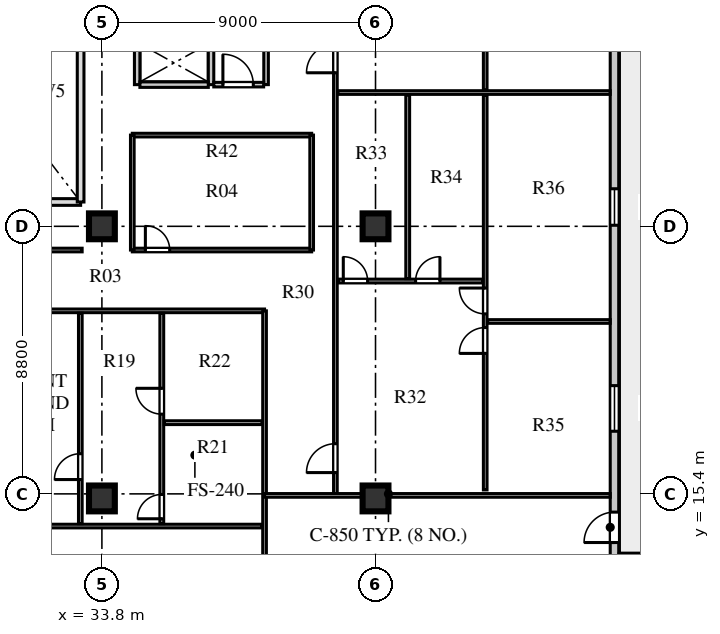
"""IFC4 building model, lengths in metres.
Left out: names, types, materials, properties, quantities, classifications, styles, units other than length and angle.
Written with IfcOpenShell. Run it as: python <this file> out.ifc"""

import sys

from ifc_helpers import new_model, si_unit, direction, frame, frame_2d, origin, origin_2d, place, context, subcontext, project, spatial, rectangle, extrude, element, fill, save


model = new_model("IFC4")
c1 = context("Model", 3, precision=1e-05, world=origin(), true_north=direction((0.0, 1.0)))
c2 = subcontext(c1, "Body", "Model", "MODEL_VIEW")
j1 = project(units=[si_unit("LENGTHUNIT", "METRE"), si_unit("PLANEANGLEUNIT", "RADIAN")], contexts=[c1])
p1 = place(None, origin())
s1 = spatial("IfcSite", under=j1, at=p1, CompositionType="ELEMENT")
p2 = place(p1, origin())
s2 = spatial("IfcBuilding", under=s1, at=p2, CompositionType="ELEMENT")
p3 = place(p2, frame((0.0, 0.0, 214.1)))
s3 = spatial("IfcBuildingStorey", under=s2, at=p3, CompositionType="ELEMENT", Elevation=214.1)
for number, where, z_axis, x_axis in (
    (1, (33.8, 15.25, 0.0), (0.0, 0.0, 1.0), (1.0, 0.0, 0.0)),
    (2, (33.8, 24.2, 0.0), (0.0, 0.0, 1.0), (1.0, 0.0, 0.0)),
    (3, (42.8, 15.25, 0.0), (0.0, 0.0, 1.0), (1.0, 0.0, 0.0)),
    (4, (42.8, 24.2, 0.0), (0.0, 0.0, 1.0), (1.0, 0.0, 0.0)),
):
    element("IfcColumn", number, at=place(p3, frame(where, z_axis=z_axis, x_axis=x_axis)), inside=s3, PredefinedType="COLUMN", context=c2, shape_type="SweptSolid", body=[
        extrude(rectangle(XDim=0.85, YDim=0.85, at=origin_2d()), origin(), (0.0, 0.0, 1.0), 3.66),
    ])
p4 = place(p3, frame((50.66, 13.13, 0.0), z_axis=(0.0, 0.0, 1.0), x_axis=(0.0, 1.0, 0.0)))
e5 = element("IfcWall", 5, at=p4, inside=s3, PredefinedType="STANDARD", context=c2, shape_type="SweptSolid", body=[
    extrude(rectangle(XDim=30.94, YDim=0.28, at=frame_2d((15.47, 0.0))), origin(), (0.0, 0.0, 1.0), 3.66),
])
p5 = place(p4, frame((0.67, 0.0, 0.0)))
e6 = element("IfcOpeningElement", 6, at=p5, cuts=e5, PredefinedType="OPENING", context=c2, shape_type="SweptSolid", body=[
    extrude(rectangle(XDim=1.0, YDim=2.05, at=frame_2d((0.5, 1.025))), frame((0.0, 0.15, 0.0), z_axis=(0.0, -1.0, 0.0), x_axis=(1.0, 0.0, 0.0)), (0.0, 0.0, 1.0), 0.3),
])
p6 = place(p4, frame((4.33, 0.0, 0.8)))
e7 = element("IfcOpeningElement", 7, at=p6, cuts=e5, PredefinedType="OPENING", context=c2, shape_type="SweptSolid", body=[
    extrude(rectangle(XDim=1.5, YDim=2.0, at=frame_2d((0.75, 1.0))), frame((0.0, 0.15, 0.0), z_axis=(0.0, -1.0, 0.0), x_axis=(1.0, 0.0, 0.0)), (0.0, 0.0, 1.0), 0.3),
])
p7 = place(p4, frame((11.105, 0.0, 0.8)))
e8 = element("IfcOpeningElement", 8, at=p7, cuts=e5, PredefinedType="OPENING", context=c2, shape_type="SweptSolid", body=[
    extrude(rectangle(XDim=1.2, YDim=1.75, at=frame_2d((0.6, 0.875))), frame((0.0, 0.15, 0.0), z_axis=(0.0, -1.0, 0.0), x_axis=(1.0, 0.0, 0.0)), (0.0, 0.0, 1.0), 0.3),
])
p8 = place(p4, frame((17.558, 0.0, 0.8)))
e9 = element("IfcOpeningElement", 9, at=p8, cuts=e5, PredefinedType="OPENING", context=c2, shape_type="SweptSolid", body=[
    extrude(rectangle(XDim=2.4, YDim=2.05, at=frame_2d((1.2, 1.025))), frame((0.0, 0.15, 0.0), z_axis=(0.0, -1.0, 0.0), x_axis=(1.0, 0.0, 0.0)), (0.0, 0.0, 1.0), 0.3),
])
p9 = place(p4, frame((24.332, 0.0, 0.8)))
e10 = element("IfcOpeningElement", 10, at=p9, cuts=e5, PredefinedType="OPENING", context=c2, shape_type="SweptSolid", body=[
    extrude(rectangle(XDim=2.1, YDim=1.95, at=frame_2d((1.05, 0.975))), frame((0.0, 0.15, 0.0), z_axis=(0.0, -1.0, 0.0), x_axis=(1.0, 0.0, 0.0)), (0.0, 0.0, 1.0), 0.3),
])
p10 = place(p4, frame((29.175, 0.0, 0.8)))
e11 = element("IfcOpeningElement", 11, at=p10, cuts=e5, PredefinedType="OPENING", context=c2, shape_type="SweptSolid", body=[
    extrude(rectangle(XDim=1.2, YDim=1.75, at=frame_2d((0.6, 0.875))), frame((0.0, 0.15, 0.0), z_axis=(0.0, -1.0, 0.0), x_axis=(1.0, 0.0, 0.0)), (0.0, 0.0, 1.0), 0.3),
])
p11 = place(p3, frame((34.96, 28.86, 0.0), z_axis=(0.0, 0.0, 1.0), x_axis=(0.0, 1.0, 0.0)))
e12 = element("IfcWall", 12, at=p11, inside=s3, PredefinedType="SOLIDWALL", context=c2, shape_type="SweptSolid", body=[
    extrude(rectangle(XDim=4.22, YDim=0.18, at=frame_2d((2.11, 0.0))), origin(), (0.0, 0.0, 1.0), 3.66),
])
p12 = place(p3, frame((37.39, 28.86, 0.0), z_axis=(0.0, 0.0, 1.0), x_axis=(0.0, 1.0, 0.0)))
e13 = element("IfcWall", 13, at=p12, inside=s3, PredefinedType="SOLIDWALL", context=c2, shape_type="SweptSolid", body=[
    extrude(rectangle(XDim=4.22, YDim=0.18, at=frame_2d((2.11, 0.0))), origin(), (0.0, 0.0, 1.0), 3.66),
])
p13 = place(p12, frame((2.1, 0.0, 0.0)))
e14 = element("IfcOpeningElement", 14, at=p13, cuts=e13, PredefinedType="OPENING", context=c2, shape_type="SweptSolid", body=[
    extrude(rectangle(XDim=1.2, YDim=2.12, at=frame_2d((0.6, 1.06))), frame((0.0, 0.1, 0.0), z_axis=(0.0, -1.0, 0.0), x_axis=(1.0, 0.0, 0.0)), (0.0, 0.0, 1.0), 0.2),
])
p14 = place(p3, frame((35.05, 28.86, 0.0), z_axis=(0.0, 0.0, 1.0), x_axis=(1.0, 0.0, 0.0)))
e15 = element("IfcWall", 15, at=p14, inside=s3, PredefinedType="SOLIDWALL", context=c2, shape_type="SweptSolid", body=[
    extrude(rectangle(XDim=2.25, YDim=0.18, at=frame_2d((1.125, 0.0))), origin(), (0.0, 0.0, 1.0), 3.66),
])
p15 = place(p3, frame((39.2, 28.86, 0.0), z_axis=(0.0, 0.0, 1.0), x_axis=(0.0, 1.0, 0.0)))
e16 = element("IfcWall", 16, at=p15, inside=s3, PredefinedType="PARTITIONING", context=c2, shape_type="SweptSolid", body=[
    extrude(rectangle(XDim=4.22, YDim=0.15, at=frame_2d((2.11, 0.0))), origin(), (0.0, 0.0, 1.0), 3.66),
])
p16 = place(p3, frame((37.48, 28.86, 0.0), z_axis=(0.0, 0.0, 1.0), x_axis=(1.0, 0.0, 0.0)))
e17 = element("IfcWall", 17, at=p16, inside=s3, PredefinedType="PARTITIONING", context=c2, shape_type="SweptSolid", body=[
    extrude(rectangle(XDim=1.64, YDim=0.15, at=frame_2d((0.82, 0.0))), origin(), (0.0, 0.0, 1.0), 3.66),
])
p17 = place(p16, frame((0.3, 0.0, 0.0)))
e18 = element("IfcOpeningElement", 18, at=p17, cuts=e17, PredefinedType="OPENING", context=c2, shape_type="SweptSolid", body=[
    extrude(rectangle(XDim=1.0, YDim=2.1, at=frame_2d((0.5, 1.05))), frame((0.0, 0.085, 0.0), z_axis=(0.0, -1.0, 0.0), x_axis=(1.0, 0.0, 0.0)), (0.0, 0.0, 1.0), 0.17),
])
p18 = place(p3, frame((27.08, 21.42, 0.0), z_axis=(0.0, 0.0, 1.0), x_axis=(1.0, 0.0, 0.0)))
e19 = element("IfcWall", 19, at=p18, inside=s3, PredefinedType="PARTITIONING", context=c2, shape_type="SweptSolid", body=[
    extrude(rectangle(XDim=12.07, YDim=0.12, at=frame_2d((6.035, 0.0))), origin(), (0.0, 0.0, 1.0), 3.31),
])
p19 = place(p18, frame((0.63, 0.0, 0.0)))
e20 = element("IfcOpeningElement", 20, at=p19, cuts=e19, PredefinedType="OPENING", context=c2, shape_type="SweptSolid", body=[
    extrude(rectangle(XDim=0.95, YDim=2.1, at=frame_2d((0.475, 1.05))), frame((0.0, 0.07, 0.0), z_axis=(0.0, -1.0, 0.0), x_axis=(1.0, 0.0, 0.0)), (0.0, 0.0, 1.0), 0.14),
])
p20 = place(p3, frame((27.15, 23.42, 0.0), z_axis=(0.0, 0.0, 1.0), x_axis=(1.0, 0.0, 0.0)))
e21 = element("IfcWall", 21, at=p20, inside=s3, PredefinedType="PARTITIONING", context=c2, shape_type="SweptSolid", body=[
    extrude(rectangle(XDim=6.0, YDim=0.12, at=frame_2d((3.0, 0.0))), origin(), (0.0, 0.0, 1.0), 3.66),
])
p21 = place(p3, frame((39.15, 7.88, 0.0), z_axis=(0.0, 0.0, 1.0), x_axis=(0.0, 1.0, 0.0)))
e22 = element("IfcWall", 22, at=p21, inside=s3, PredefinedType="PARTITIONING", context=c2, shape_type="SweptSolid", body=[
    extrude(rectangle(XDim=13.54, YDim=0.12, at=frame_2d((6.77, 0.0))), origin(), (0.0, 0.0, 1.0), 3.66),
])
p22 = place(p3, frame((27.24, 14.341, 0.0), z_axis=(0.0, 0.0, 1.0), x_axis=(1.0, 0.0, 0.0)))
e23 = element("IfcWall", 23, at=p22, inside=s3, PredefinedType="PARTITIONING", context=c2, shape_type="SweptSolid", body=[
    extrude(rectangle(XDim=11.83, YDim=0.12, at=frame_2d((5.915, 0.0))), origin(), (0.0, 0.0, 1.0), 3.66),
])
p23 = place(p22, frame((0.3, 0.0, 0.0)))
e24 = element("IfcOpeningElement", 24, at=p23, cuts=e23, PredefinedType="OPENING", context=c2, shape_type="SweptSolid", body=[
    extrude(rectangle(XDim=0.85, YDim=2.08, at=frame_2d((0.425, 1.04))), frame((0.0, 0.07, 0.0), z_axis=(0.0, -1.0, 0.0), x_axis=(1.0, 0.0, 0.0)), (0.0, 0.0, 1.0), 0.14),
])
p24 = place(p22, frame((3.135, 0.0, 0.0)))
e25 = element("IfcOpeningElement", 25, at=p24, cuts=e23, PredefinedType="OPENING", context=c2, shape_type="SweptSolid", body=[
    extrude(rectangle(XDim=0.85, YDim=2.08, at=frame_2d((0.425, 1.04))), frame((0.0, 0.07, 0.0), z_axis=(0.0, -1.0, 0.0), x_axis=(1.0, 0.0, 0.0)), (0.0, 0.0, 1.0), 0.14),
])
p25 = place(p3, frame((35.77, 14.421, 0.0), z_axis=(0.0, 0.0, 1.0), x_axis=(0.0, 1.0, 0.0)))
e26 = element("IfcWall", 26, at=p25, inside=s3, PredefinedType="PLUMBINGWALL", context=c2, shape_type="SweptSolid", body=[
    extrude(rectangle(XDim=6.919, YDim=0.125, at=frame_2d((3.459, 0.0))), origin(), (0.0, 0.0, 1.0), 3.66),
])
p26 = place(p25, frame((0.16, 0.0, 0.0)))
e27 = element("IfcOpeningElement", 27, at=p26, cuts=e26, PredefinedType="OPENING", context=c2, shape_type="SweptSolid", body=[
    extrude(rectangle(XDim=0.8, YDim=2.05, at=frame_2d((0.4, 1.025))), frame((0.0, 0.073, 0.0), z_axis=(0.0, -1.0, 0.0), x_axis=(1.0, 0.0, 0.0)), (0.0, 0.0, 1.0), 0.145),
])
p27 = place(p25, frame((3.601, 0.0, 0.0)))
e28 = element("IfcOpeningElement", 28, at=p27, cuts=e26, PredefinedType="OPENING", context=c2, shape_type="SweptSolid", body=[
    extrude(rectangle(XDim=0.85, YDim=2.08, at=frame_2d((0.425, 1.04))), frame((0.0, 0.073, 0.0), z_axis=(0.0, -1.0, 0.0), x_axis=(1.0, 0.0, 0.0)), (0.0, 0.0, 1.0), 0.145),
])
p28 = place(p3, frame((35.85, 17.742, 0.0), z_axis=(0.0, 0.0, 1.0), x_axis=(1.0, 0.0, 0.0)))
e29 = element("IfcWall", 29, at=p28, inside=s3, PredefinedType="PLUMBINGWALL", context=c2, shape_type="SweptSolid", body=[
    extrude(rectangle(XDim=3.22, YDim=0.125, at=frame_2d((1.61, 0.0))), origin(), (0.0, 0.0, 1.0), 3.66),
])
p29 = place(p3, frame((33.09, 14.421, 0.0), z_axis=(0.0, 0.0, 1.0), x_axis=(0.0, 1.0, 0.0)))
e30 = element("IfcWall", 30, at=p29, inside=s3, PredefinedType="PARTITIONING", context=c2, shape_type="SweptSolid", body=[
    extrude(rectangle(XDim=6.919, YDim=0.12, at=frame_2d((3.459, 0.0))), origin(), (0.0, 0.0, 1.0), 3.66),
])
p30 = place(p29, frame((1.45, 0.0, 0.0)))
e31 = element("IfcOpeningElement", 31, at=p30, cuts=e30, PredefinedType="OPENING", context=c2, shape_type="SweptSolid", body=[
    extrude(rectangle(XDim=0.85, YDim=2.08, at=frame_2d((0.425, 1.04))), frame((0.0, 0.07, 0.0), z_axis=(0.0, -1.0, 0.0), x_axis=(1.0, 0.0, 0.0)), (0.0, 0.0, 1.0), 0.14),
])
p31 = place(p3, frame((41.48, 15.35, 0.0), z_axis=(0.0, 0.0, 1.0), x_axis=(0.0, 1.0, 0.0)))
e32 = element("IfcWall", 32, at=p31, inside=s3, PredefinedType="PARTITIONING", context=c2, shape_type="SweptSolid", body=[
    extrude(rectangle(XDim=26.5, YDim=0.12, at=frame_2d((13.25, 0.0))), origin(), (0.0, 0.0, 1.0), 3.66),
])
p32 = place(p31, frame((0.75, 0.0, 0.0)))
e33 = element("IfcOpeningElement", 33, at=p32, cuts=e32, PredefinedType="OPENING", context=c2, shape_type="SweptSolid", body=[
    extrude(rectangle(XDim=0.95, YDim=2.1, at=frame_2d((0.475, 1.05))), frame((0.0, 0.07, 0.0), z_axis=(0.0, -1.0, 0.0), x_axis=(1.0, 0.0, 0.0)), (0.0, 0.0, 1.0), 0.14),
])
p33 = place(p31, frame((13.9, 0.0, 0.0)))
e34 = element("IfcOpeningElement", 34, at=p33, cuts=e32, PredefinedType="OPENING", context=c2, shape_type="SweptSolid", body=[
    extrude(rectangle(XDim=0.95, YDim=2.1, at=frame_2d((0.475, 1.05))), frame((0.0, 0.07, 0.0), z_axis=(0.0, -1.0, 0.0), x_axis=(1.0, 0.0, 0.0)), (0.0, 0.0, 1.0), 0.14),
])
p34 = place(p3, frame((39.15, 15.35, 0.0), z_axis=(0.0, 0.0, 1.0), x_axis=(1.0, 0.0, 0.0)))
e35 = element("IfcWall", 35, at=p34, inside=s3, PredefinedType="PARTITIONING", context=c2, shape_type="SweptSolid", body=[
    extrude(rectangle(XDim=11.37, YDim=0.12, at=frame_2d((5.685, 0.0))), origin(), (0.0, 0.0, 1.0), 3.06),
])
p35 = place(p3, frame((46.408, 15.53, 0.0), z_axis=(0.0, 0.0, 1.0), x_axis=(0.0, 1.0, 0.0)))
e36 = element("IfcWall", 36, at=p35, inside=s3, PredefinedType="PARTITIONING", context=c2, shape_type="SweptSolid", body=[
    extrude(rectangle(XDim=12.99, YDim=0.12, at=frame_2d((6.495, 0.0))), origin(), (0.0, 0.0, 1.0), 3.66),
])
p36 = place(p35, frame((4.49, 0.0, 0.0)))
e37 = element("IfcOpeningElement", 37, at=p36, cuts=e36, PredefinedType="OPENING", context=c2, shape_type="SweptSolid", body=[
    extrude(rectangle(XDim=0.85, YDim=2.08, at=frame_2d((0.425, 1.04))), frame((0.0, 0.07, 0.0), z_axis=(0.0, -1.0, 0.0), x_axis=(1.0, 0.0, 0.0)), (0.0, 0.0, 1.0), 0.14),
])
p37 = place(p35, frame((5.79, 0.0, 0.0)))
e38 = element("IfcOpeningElement", 38, at=p37, cuts=e36, PredefinedType="OPENING", context=c2, shape_type="SweptSolid", body=[
    extrude(rectangle(XDim=0.85, YDim=2.08, at=frame_2d((0.425, 1.04))), frame((0.0, 0.07, 0.0), z_axis=(0.0, -1.0, 0.0), x_axis=(1.0, 0.0, 0.0)), (0.0, 0.0, 1.0), 0.14),
])
p38 = place(p3, frame((41.58, 22.4, 0.0), z_axis=(0.0, 0.0, 1.0), x_axis=(1.0, 0.0, 0.0)))
e39 = element("IfcWall", 39, at=p38, inside=s3, PredefinedType="PLUMBINGWALL", context=c2, shape_type="SweptSolid", body=[
    extrude(rectangle(XDim=4.748, YDim=0.125, at=frame_2d((2.374, 0.0))), origin(), (0.0, 0.0, 1.0), 3.66),
])
p39 = place(p38, frame((0.16, 0.0, 0.0)))
e40 = element("IfcOpeningElement", 40, at=p39, cuts=e39, PredefinedType="OPENING", context=c2, shape_type="SweptSolid", body=[
    extrude(rectangle(XDim=0.8, YDim=2.05, at=frame_2d((0.4, 1.025))), frame((0.0, 0.073, 0.0), z_axis=(0.0, -1.0, 0.0), x_axis=(1.0, 0.0, 0.0)), (0.0, 0.0, 1.0), 0.145),
])
p40 = place(p38, frame((2.539, 0.0, 0.0)))
e41 = element("IfcOpeningElement", 41, at=p40, cuts=e39, PredefinedType="OPENING", context=c2, shape_type="SweptSolid", body=[
    extrude(rectangle(XDim=0.8, YDim=2.05, at=frame_2d((0.4, 1.025))), frame((0.0, 0.073, 0.0), z_axis=(0.0, -1.0, 0.0), x_axis=(1.0, 0.0, 0.0)), (0.0, 0.0, 1.0), 0.145),
])
p41 = place(p3, frame((43.859, 22.48, 0.0), z_axis=(0.0, 0.0, 1.0), x_axis=(0.0, 1.0, 0.0)))
e42 = element("IfcWall", 42, at=p41, inside=s3, PredefinedType="PLUMBINGWALL", context=c2, shape_type="SweptSolid", body=[
    extrude(rectangle(XDim=6.04, YDim=0.125, at=frame_2d((3.02, 0.0))), origin(), (0.0, 0.0, 1.0), 3.66),
])
p42 = place(p3, frame((46.488, 21.07, 0.0), z_axis=(0.0, 0.0, 1.0), x_axis=(1.0, 0.0, 0.0)))
e43 = element("IfcWall", 43, at=p42, inside=s3, PredefinedType="PARTITIONING", context=c2, shape_type="SweptSolid", body=[
    extrude(rectangle(XDim=4.032, YDim=0.12, at=frame_2d((2.016, 0.0))), origin(), (0.0, 0.0, 1.0), 3.66),
])
p43 = place(p3, frame((41.56, 28.6, 0.0), z_axis=(0.0, 0.0, 1.0), x_axis=(1.0, 0.0, 0.0)))
e44 = element("IfcWall", 44, at=p43, inside=s3, PredefinedType="PARTITIONING", context=c2, shape_type="SweptSolid", body=[
    extrude(rectangle(XDim=8.96, YDim=0.12, at=frame_2d((4.48, 0.0))), origin(), (0.0, 0.0, 1.0), 3.66),
])
p44 = place(p3, frame((46.408, 28.68, 0.0), z_axis=(0.0, 0.0, 1.0), x_axis=(0.0, 1.0, 0.0)))
e45 = element("IfcWall", 45, at=p44, inside=s3, PredefinedType="PARTITIONING", context=c2, shape_type="SweptSolid", body=[
    extrude(rectangle(XDim=12.99, YDim=0.12, at=frame_2d((6.495, 0.0))), origin(), (0.0, 0.0, 1.0), 3.66),
])
p45 = place(p44, frame((5.445, 0.0, 0.0)))
e46 = element("IfcOpeningElement", 46, at=p45, cuts=e45, PredefinedType="OPENING", context=c2, shape_type="SweptSolid", body=[
    extrude(rectangle(XDim=0.85, YDim=2.08, at=frame_2d((0.425, 1.04))), frame((0.0, 0.07, 0.0), z_axis=(0.0, -1.0, 0.0), x_axis=(1.0, 0.0, 0.0)), (0.0, 0.0, 1.0), 0.14),
])
p46 = place(p44, frame((6.745, 0.0, 0.0)))
e47 = element("IfcOpeningElement", 47, at=p46, cuts=e45, PredefinedType="OPENING", context=c2, shape_type="SweptSolid", body=[
    extrude(rectangle(XDim=0.85, YDim=2.08, at=frame_2d((0.425, 1.04))), frame((0.0, 0.07, 0.0), z_axis=(0.0, -1.0, 0.0), x_axis=(1.0, 0.0, 0.0)), (0.0, 0.0, 1.0), 0.14),
])
p47 = place(p3, frame((34.8, 23.42, 0.0), z_axis=(0.0, 0.0, 1.0), x_axis=(1.0, 0.0, 0.0)))
e48 = element("IfcWall", 48, at=p47, inside=s3, PredefinedType="PARTITIONING", context=c2, shape_type="SweptSolid", body=[
    extrude(rectangle(XDim=5.9, YDim=0.12, at=frame_2d((2.95, 0.0))), origin(), (0.0, 0.0, 1.0), 3.66),
])
p48 = place(p47, frame((0.43, 0.0, 0.0)))
e49 = element("IfcOpeningElement", 49, at=p48, cuts=e48, PredefinedType="OPENING", context=c2, shape_type="SweptSolid", body=[
    extrude(rectangle(XDim=0.8, YDim=2.05, at=frame_2d((0.4, 1.025))), frame((0.0, 0.07, 0.0), z_axis=(0.0, -1.0, 0.0), x_axis=(1.0, 0.0, 0.0)), (0.0, 0.0, 1.0), 0.14),
])
p49 = place(p3, frame((34.8, 27.2, 0.0), z_axis=(0.0, 0.0, 1.0), x_axis=(1.0, 0.0, 0.0)))
e50 = element("IfcWall", 50, at=p49, inside=s3, PredefinedType="PARTITIONING", context=c2, shape_type="SweptSolid", body=[
    extrude(rectangle(XDim=5.9, YDim=0.12, at=frame_2d((2.95, 0.0))), origin(), (0.0, 0.0, 1.0), 3.31),
])
for number, where, z_axis, x_axis in (
    (51, (34.8, 23.42, 0.0), (0.0, 0.0, 1.0), (0.0, 1.0, 0.0)),
    (52, (40.7, 23.42, 0.0), (0.0, 0.0, 1.0), (0.0, 1.0, 0.0)),
):
    element("IfcWall", number, at=place(p3, frame(where, z_axis=z_axis, x_axis=x_axis)), inside=s3, PredefinedType="PARTITIONING", context=c2, shape_type="SweptSolid", body=[
        extrude(rectangle(XDim=3.78, YDim=0.12, at=frame_2d((1.89, 0.0))), origin(), (0.0, 0.0, 1.0), 3.66),
    ])
p50 = place(p5, frame((1.0, 0.0, 0.0), z_axis=(0.0, 0.0, 1.0), x_axis=(-1.0, 0.0, 0.0)))
e53 = element("IfcDoor", 53, at=p50, inside=s3, OperationType="SINGLE_SWING_RIGHT", PredefinedType="DOOR", context=c2, shape_type="SweptSolid", body=[
    extrude(rectangle(XDim=1.0, YDim=2.05, at=frame_2d((0.5, 1.025))), frame((0.0, 0.025, 0.0), z_axis=(0.0, -1.0, 0.0), x_axis=(1.0, 0.0, 0.0)), (0.0, 0.0, 1.0), 0.05),
])
fill(e6, e53)
p51 = place(p6, origin())
e54 = element("IfcWindow", 54, at=p51, inside=s3, PartitioningType="SINGLE_PANEL", PredefinedType="WINDOW", context=c2, shape_type="SweptSolid", body=[
    extrude(rectangle(XDim=1.5, YDim=2.0, at=frame_2d((0.75, 1.0))), frame((0.0, 0.03, 0.0), z_axis=(0.0, -1.0, 0.0), x_axis=(1.0, 0.0, 0.0)), (0.0, 0.0, 1.0), 0.06),
])
fill(e7, e54)
p52 = place(p7, origin())
e55 = element("IfcWindow", 55, at=p52, inside=s3, PartitioningType="SINGLE_PANEL", PredefinedType="WINDOW", context=c2, shape_type="SweptSolid", body=[
    extrude(rectangle(XDim=1.2, YDim=1.75, at=frame_2d((0.6, 0.875))), frame((0.0, 0.03, 0.0), z_axis=(0.0, -1.0, 0.0), x_axis=(1.0, 0.0, 0.0)), (0.0, 0.0, 1.0), 0.06),
])
fill(e8, e55)
p53 = place(p17, origin())
e56 = element("IfcDoor", 56, at=p53, inside=s3, OperationType="SINGLE_SWING_LEFT", PredefinedType="DOOR", context=c2, shape_type="SweptSolid", body=[
    extrude(rectangle(XDim=1.0, YDim=2.1, at=frame_2d((0.5, 1.05))), frame((0.0, 0.025, 0.0), z_axis=(0.0, -1.0, 0.0), x_axis=(1.0, 0.0, 0.0)), (0.0, 0.0, 1.0), 0.05),
])
fill(e18, e56)
p54 = place(p30, origin())
e57 = element("IfcDoor", 57, at=p54, inside=s3, OperationType="SINGLE_SWING_LEFT", PredefinedType="DOOR", context=c2, shape_type="SweptSolid", body=[
    extrude(rectangle(XDim=0.85, YDim=2.08, at=frame_2d((0.425, 1.04))), frame((0.0, 0.025, 0.0), z_axis=(0.0, -1.0, 0.0), x_axis=(1.0, 0.0, 0.0)), (0.0, 0.0, 1.0), 0.05),
])
fill(e31, e57)
p55 = place(p26, origin())
e58 = element("IfcDoor", 58, at=p55, inside=s3, OperationType="SINGLE_SWING_LEFT", PredefinedType="DOOR", context=c2, shape_type="SweptSolid", body=[
    extrude(rectangle(XDim=0.8, YDim=2.05, at=frame_2d((0.4, 1.025))), frame((0.0, 0.025, 0.0), z_axis=(0.0, -1.0, 0.0), x_axis=(1.0, 0.0, 0.0)), (0.0, 0.0, 1.0), 0.05),
])
fill(e27, e58)
p56 = place(p27, origin())
e59 = element("IfcDoor", 59, at=p56, inside=s3, OperationType="SINGLE_SWING_RIGHT", PredefinedType="DOOR", context=c2, shape_type="SweptSolid", body=[
    extrude(rectangle(XDim=0.85, YDim=2.08, at=frame_2d((0.425, 1.04))), frame((0.0, 0.025, 0.0), z_axis=(0.0, -1.0, 0.0), x_axis=(1.0, 0.0, 0.0)), (0.0, 0.0, 1.0), 0.05),
])
fill(e28, e59)
p57 = place(p39, origin())
e60 = element("IfcDoor", 60, at=p57, inside=s3, OperationType="SINGLE_SWING_LEFT", PredefinedType="DOOR", context=c2, shape_type="SweptSolid", body=[
    extrude(rectangle(XDim=0.8, YDim=2.05, at=frame_2d((0.4, 1.025))), frame((0.0, 0.025, 0.0), z_axis=(0.0, -1.0, 0.0), x_axis=(1.0, 0.0, 0.0)), (0.0, 0.0, 1.0), 0.05),
])
fill(e40, e60)
p58 = place(p40, origin())
e61 = element("IfcDoor", 61, at=p58, inside=s3, OperationType="SINGLE_SWING_RIGHT", PredefinedType="DOOR", context=c2, shape_type="SweptSolid", body=[
    extrude(rectangle(XDim=0.8, YDim=2.05, at=frame_2d((0.4, 1.025))), frame((0.0, 0.025, 0.0), z_axis=(0.0, -1.0, 0.0), x_axis=(1.0, 0.0, 0.0)), (0.0, 0.0, 1.0), 0.05),
])
fill(e41, e61)
p59 = place(p36, origin())
e62 = element("IfcDoor", 62, at=p59, inside=s3, OperationType="SINGLE_SWING_LEFT", PredefinedType="DOOR", context=c2, shape_type="SweptSolid", body=[
    extrude(rectangle(XDim=0.85, YDim=2.08, at=frame_2d((0.425, 1.04))), frame((0.0, 0.025, 0.0), z_axis=(0.0, -1.0, 0.0), x_axis=(1.0, 0.0, 0.0)), (0.0, 0.0, 1.0), 0.05),
])
fill(e37, e62)
p60 = place(p37, origin())
e63 = element("IfcDoor", 63, at=p60, inside=s3, OperationType="SINGLE_SWING_RIGHT", PredefinedType="DOOR", context=c2, shape_type="SweptSolid", body=[
    extrude(rectangle(XDim=0.85, YDim=2.08, at=frame_2d((0.425, 1.04))), frame((0.0, 0.025, 0.0), z_axis=(0.0, -1.0, 0.0), x_axis=(1.0, 0.0, 0.0)), (0.0, 0.0, 1.0), 0.05),
])
fill(e38, e63)
p61 = place(p32, origin())
e64 = element("IfcDoor", 64, at=p61, inside=s3, OperationType="SINGLE_SWING_LEFT", PredefinedType="DOOR", context=c2, shape_type="SweptSolid", body=[
    extrude(rectangle(XDim=0.95, YDim=2.1, at=frame_2d((0.475, 1.05))), frame((0.0, 0.025, 0.0), z_axis=(0.0, -1.0, 0.0), x_axis=(1.0, 0.0, 0.0)), (0.0, 0.0, 1.0), 0.05),
])
fill(e33, e64)
p62 = place(p33, origin())
e65 = element("IfcDoor", 65, at=p62, inside=s3, OperationType="SINGLE_SWING_LEFT", PredefinedType="DOOR", context=c2, shape_type="SweptSolid", body=[
    extrude(rectangle(XDim=0.95, YDim=2.1, at=frame_2d((0.475, 1.05))), frame((0.0, 0.025, 0.0), z_axis=(0.0, -1.0, 0.0), x_axis=(1.0, 0.0, 0.0)), (0.0, 0.0, 1.0), 0.05),
])
fill(e34, e65)
p63 = place(p48, origin())
e66 = element("IfcDoor", 66, at=p63, inside=s3, OperationType="SINGLE_SWING_LEFT", PredefinedType="DOOR", context=c2, shape_type="SweptSolid", body=[
    extrude(rectangle(XDim=0.8, YDim=2.05, at=frame_2d((0.4, 1.025))), frame((0.0, 0.025, 0.0), z_axis=(0.0, -1.0, 0.0), x_axis=(1.0, 0.0, 0.0)), (0.0, 0.0, 1.0), 0.05),
])
fill(e49, e66)
save(model, sys.argv[1])
